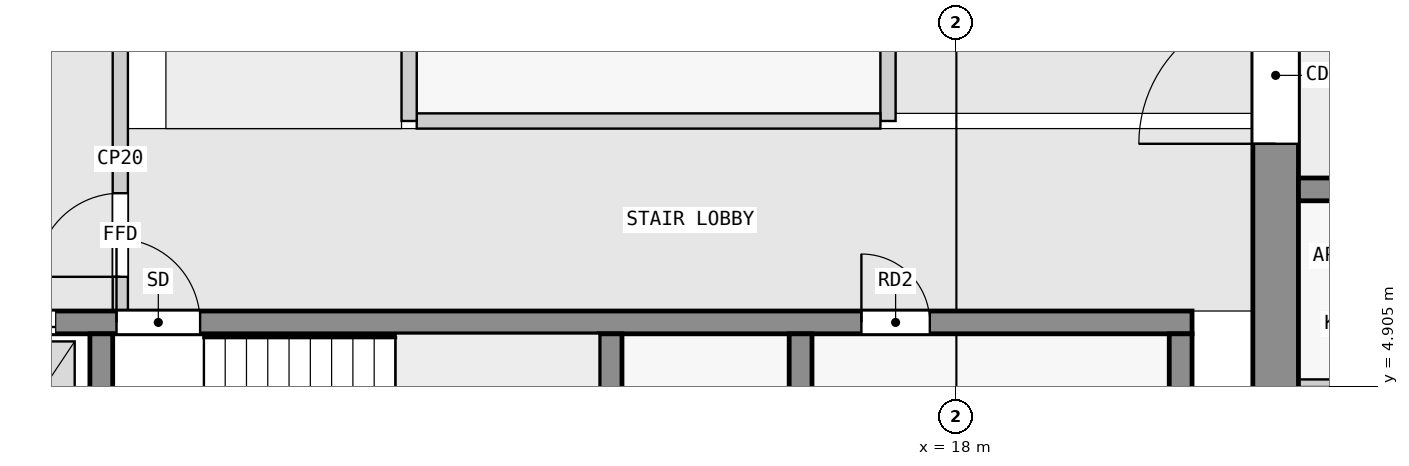
"""IFC4 building model, lengths in metres.
Left out: names, types, materials, properties, quantities, classifications, styles, units other than length and angle.
Written with IfcOpenShell. Run it as: python <this file> out.ifc"""

import sys

from ifc_helpers import new_model, si_unit, direction, frame, frame_2d, origin, place, context, subcontext, project, spatial, rectangle, extrude, element, fill, save


model = new_model("IFC4")
c1 = context("Model", 3, precision=1e-05, world=origin(), true_north=direction((0.0, 1.0)))
c2 = subcontext(c1, "Body", "Model", "MODEL_VIEW")
j1 = project(units=[si_unit("LENGTHUNIT", "METRE"), si_unit("PLANEANGLEUNIT", "RADIAN")], contexts=[c1])
p1 = place(None, origin())
s1 = spatial("IfcSite", under=j1, at=p1, CompositionType="ELEMENT")
p2 = place(p1, origin())
s2 = spatial("IfcBuilding", under=s1, at=p2, CompositionType="ELEMENT")
p3 = place(p2, frame((0.0, 0.0, 156.9)))
s3 = spatial("IfcBuildingStorey", under=s2, at=p3, CompositionType="ELEMENT", Elevation=156.9)
p4 = place(p3, frame((22.2, 2.5, 0.0), z_axis=(0.0, 0.0, 1.0), x_axis=(0.0, 1.0, 0.0)))
e1 = element("IfcWall", 1, at=p4, inside=s3, PredefinedType="SHEAR", context=c2, shape_type="SweptSolid", body=[
    extrude(rectangle(XDim=14.9, YDim=0.6, at=frame_2d((7.45, 0.0))), origin(), (0.0, 0.0, 1.0), 3.25),
])
p5 = place(p4, frame((5.6, 0.0, 0.0)))
e2 = element("IfcOpeningElement", 2, at=p5, cuts=e1, PredefinedType="OPENING", context=c2, shape_type="SweptSolid", body=[
    extrude(rectangle(XDim=1.8, YDim=2.1, at=frame_2d((0.9, 1.05))), frame((0.0, 0.31, 0.0), z_axis=(0.0, -1.0, 0.0), x_axis=(1.0, 0.0, 0.0)), (0.0, 0.0, 1.0), 0.62),
])
for number, where, z_axis, x_axis in (
    (3, (6.75, 2.8, 0.0), (0.0, 0.0, 1.0), (0.0, 1.0, 0.0)),
    (4, (13.45, 2.8, 0.0), (0.0, 0.0, 1.0), (0.0, 1.0, 0.0)),
    (5, (20.95, 2.8, 0.0), (0.0, 0.0, 1.0), (0.0, 1.0, 0.0)),
):
    element("IfcWall", number, at=place(p3, frame(where, z_axis=z_axis, x_axis=x_axis)), inside=s3, PredefinedType="SHEAR", context=c2, shape_type="SweptSolid", body=[
        extrude(rectangle(XDim=2.8, YDim=0.3, at=frame_2d((1.4, 0.0))), origin(), (0.0, 0.0, 1.0), 3.25),
    ])
p6 = place(p3, frame((2.3, 5.75, 0.0), z_axis=(0.0, 0.0, 1.0), x_axis=(1.0, 0.0, 0.0)))
e6 = element("IfcWall", 6, at=p6, inside=s3, PredefinedType="SHEAR", context=c2, shape_type="SweptSolid", body=[
    extrude(rectangle(XDim=18.8, YDim=0.3, at=frame_2d((9.4, 0.0))), origin(), (0.0, 0.0, 1.0), 3.25),
])
p7 = place(p6, frame((4.65, 0.0, 0.0)))
e7 = element("IfcOpeningElement", 7, at=p7, cuts=e6, PredefinedType="OPENING", context=c2, shape_type="SweptSolid", body=[
    extrude(rectangle(XDim=1.1, YDim=2.1, at=frame_2d((0.55, 1.05))), frame((0.0, 0.16, 0.0), z_axis=(0.0, -1.0, 0.0), x_axis=(1.0, 0.0, 0.0)), (0.0, 0.0, 1.0), 0.32),
])
p8 = place(p6, frame((0.45, 0.0, 0.0)))
e8 = element("IfcOpeningElement", 8, at=p8, cuts=e6, PredefinedType="OPENING", context=c2, shape_type="SweptSolid", body=[
    extrude(rectangle(XDim=1.1, YDim=2.1, at=frame_2d((0.55, 1.05))), frame((0.0, 0.16, 0.0), z_axis=(0.0, -1.0, 0.0), x_axis=(1.0, 0.0, 0.0)), (0.0, 0.0, 1.0), 0.32),
])
p9 = place(p6, frame((2.75, 0.0, 0.0)))
e9 = element("IfcOpeningElement", 9, at=p9, cuts=e6, PredefinedType="OPENING", context=c2, shape_type="SweptSolid", body=[
    extrude(rectangle(XDim=1.1, YDim=2.1, at=frame_2d((0.55, 1.05))), frame((0.0, 0.16, 0.0), z_axis=(0.0, -1.0, 0.0), x_axis=(1.0, 0.0, 0.0)), (0.0, 0.0, 1.0), 0.32),
])
p10 = place(p6, frame((14.45, 0.0, 0.0)))
e10 = element("IfcOpeningElement", 10, at=p10, cuts=e6, PredefinedType="OPENING", context=c2, shape_type="SweptSolid", body=[
    extrude(rectangle(XDim=0.9, YDim=2.1, at=frame_2d((0.45, 1.05))), frame((0.0, 0.16, 0.0), z_axis=(0.0, -1.0, 0.0), x_axis=(1.0, 0.0, 0.0)), (0.0, 0.0, 1.0), 0.32),
])
p11 = place(p3, frame((22.5, 7.5, 0.0), z_axis=(0.0, 0.0, 1.0), x_axis=(1.0, 0.0, 0.0)))
e11 = element("IfcWall", 11, at=p11, inside=s3, PredefinedType="SHEAR", context=c2, shape_type="SweptSolid", body=[
    extrude(rectangle(XDim=22.5, YDim=0.3, at=frame_2d((11.25, 0.0))), origin(), (0.0, 0.0, 1.0), 3.25),
])
p12 = place(p11, frame((4.05, 0.0, 0.0)))
e12 = element("IfcOpeningElement", 12, at=p12, cuts=e11, PredefinedType="OPENING", context=c2, shape_type="SweptSolid", body=[
    extrude(rectangle(XDim=1.0, YDim=2.1, at=frame_2d((0.5, 1.05))), frame((0.0, 0.16, 0.0), z_axis=(0.0, -1.0, 0.0), x_axis=(1.0, 0.0, 0.0)), (0.0, 0.0, 1.0), 0.32),
])
p13 = place(p11, frame((10.35, 0.0, 0.0)))
e13 = element("IfcOpeningElement", 13, at=p13, cuts=e11, PredefinedType="OPENING", context=c2, shape_type="SweptSolid", body=[
    extrude(rectangle(XDim=1.8, YDim=2.1, at=frame_2d((0.9, 1.05))), frame((0.0, 0.16, 0.0), z_axis=(0.0, -1.0, 0.0), x_axis=(1.0, 0.0, 0.0)), (0.0, 0.0, 1.0), 0.32),
])
p14 = place(p11, frame((16.85, 0.0, 0.0)))
e14 = element("IfcOpeningElement", 14, at=p14, cuts=e11, PredefinedType="OPENING", context=c2, shape_type="SweptSolid", body=[
    extrude(rectangle(XDim=1.0, YDim=2.1, at=frame_2d((0.5, 1.05))), frame((0.0, 0.16, 0.0), z_axis=(0.0, -1.0, 0.0), x_axis=(1.0, 0.0, 0.0)), (0.0, 0.0, 1.0), 0.32),
])
p15 = place(p3, frame((7.0, 5.9, 0.0), z_axis=(0.0, 0.0, 1.0), x_axis=(0.0, 1.0, 0.0)))
e15 = element("IfcWall", 15, at=p15, inside=s3, PredefinedType="PARTITIONING", context=c2, shape_type="SweptSolid", body=[
    extrude(rectangle(XDim=4.0, YDim=0.2, at=frame_2d((2.0, 0.0))), origin(), (0.0, 0.0, 1.0), 3.25),
])
p16 = place(p15, frame((0.45, 0.0, 0.0)))
e16 = element("IfcOpeningElement", 16, at=p16, cuts=e15, PredefinedType="OPENING", context=c2, shape_type="SweptSolid", body=[
    extrude(rectangle(XDim=1.1, YDim=2.1, at=frame_2d((0.55, 1.05))), frame((0.0, 0.11, 0.0), z_axis=(0.0, -1.0, 0.0), x_axis=(1.0, 0.0, 0.0)), (0.0, 0.0, 1.0), 0.22),
])
p17 = place(p3, frame((10.8, 8.4, 0.0), z_axis=(0.0, 0.0, 1.0), x_axis=(0.0, 1.0, 0.0)))
e17 = element("IfcWall", 17, at=p17, inside=s3, PredefinedType="PARTITIONING", context=c2, shape_type="SweptSolid", body=[
    extrude(rectangle(XDim=3.8, YDim=0.2, at=frame_2d((1.9, 0.0))), origin(), (0.0, 0.0, 1.0), 3.25),
])
p18 = place(p3, frame((10.9, 8.4, 0.0), z_axis=(0.0, 0.0, 1.0), x_axis=(1.0, 0.0, 0.0)))
e18 = element("IfcWall", 18, at=p18, inside=s3, PredefinedType="PARTITIONING", context=c2, shape_type="SweptSolid", body=[
    extrude(rectangle(XDim=6.1, YDim=0.2, at=frame_2d((3.05, 0.0))), origin(), (0.0, 0.0, 1.0), 3.25),
])
p19 = place(p3, frame((17.1, 8.4, 0.0), z_axis=(0.0, 0.0, 1.0), x_axis=(0.0, 1.0, 0.0)))
e19 = element("IfcWall", 19, at=p19, inside=s3, PredefinedType="PARTITIONING", context=c2, shape_type="SweptSolid", body=[
    extrude(rectangle(XDim=3.8, YDim=0.2, at=frame_2d((1.9, 0.0))), origin(), (0.0, 0.0, 1.0), 3.25),
])
p20 = place(p3, frame((22.5, 4.95, 0.0), z_axis=(0.0, 0.0, 1.0), x_axis=(1.0, 0.0, 0.0)))
e20 = element("IfcWall", 20, at=p20, inside=s3, PredefinedType="PARTITIONING", context=c2, shape_type="SweptSolid", body=[
    extrude(rectangle(XDim=1.75, YDim=0.1, at=frame_2d((0.875, 0.0))), origin(), (0.0, 0.0, 1.0), 3.25),
])
p21 = place(p3, frame((15.95, 2.8, 0.0), z_axis=(0.0, 0.0, 1.0), x_axis=(0.0, 1.0, 0.0)))
e21 = element("IfcWall", 21, at=p21, inside=s3, PredefinedType="SHEAR", context=c2, shape_type="SweptSolid", body=[
    extrude(rectangle(XDim=2.8, YDim=0.3, at=frame_2d((1.4, 0.0))), origin(), (0.0, 0.0, 1.0), 3.25),
])
p22 = place(p16, origin())
e22 = element("IfcDoor", 22, at=p22, inside=s3, OperationType="SINGLE_SWING_LEFT", PredefinedType="DOOR", context=c2, shape_type="SweptSolid", body=[
    extrude(rectangle(XDim=1.1, YDim=2.1, at=frame_2d((0.55, 1.05))), frame((0.0, 0.025, 0.0), z_axis=(0.0, -1.0, 0.0), x_axis=(1.0, 0.0, 0.0)), (0.0, 0.0, 1.0), 0.05),
])
fill(e16, e22)
p23 = place(p7, origin())
e23 = element("IfcDoor", 23, at=p23, inside=s3, OperationType="SINGLE_SWING_LEFT", PredefinedType="DOOR", context=c2, shape_type="SweptSolid", body=[
    extrude(rectangle(XDim=1.1, YDim=2.1, at=frame_2d((0.55, 1.05))), frame((0.0, 0.025, 0.0), z_axis=(0.0, -1.0, 0.0), x_axis=(1.0, 0.0, 0.0)), (0.0, 0.0, 1.0), 0.05),
])
fill(e7, e23)
p24 = place(p9, origin())
e24 = element("IfcDoor", 24, at=p24, inside=s3, OperationType="DOUBLE_DOOR_SLIDING", PredefinedType="DOOR", context=c2, shape_type="SweptSolid", body=[
    extrude(rectangle(XDim=1.1, YDim=2.1, at=frame_2d((0.55, 1.05))), frame((0.0, 0.025, 0.0), z_axis=(0.0, -1.0, 0.0), x_axis=(1.0, 0.0, 0.0)), (0.0, 0.0, 1.0), 0.05),
])
fill(e9, e24)
p25 = place(p5, origin())
e25 = element("IfcDoor", 25, at=p25, inside=s3, OperationType="DOUBLE_DOOR_SINGLE_SWING", PredefinedType="DOOR", context=c2, shape_type="SweptSolid", body=[
    extrude(rectangle(XDim=1.8, YDim=2.1, at=frame_2d((0.9, 1.05))), frame((0.0, 0.025, 0.0), z_axis=(0.0, -1.0, 0.0), x_axis=(1.0, 0.0, 0.0)), (0.0, 0.0, 1.0), 0.05),
])
fill(e2, e25)
p26 = place(p10, origin())
e26 = element("IfcDoor", 26, at=p26, inside=s3, OperationType="SINGLE_SWING_LEFT", PredefinedType="DOOR", context=c2, shape_type="SweptSolid", body=[
    extrude(rectangle(XDim=0.9, YDim=2.1, at=frame_2d((0.45, 1.05))), frame((0.0, 0.025, 0.0), z_axis=(0.0, -1.0, 0.0), x_axis=(1.0, 0.0, 0.0)), (0.0, 0.0, 1.0), 0.05),
])
fill(e10, e26)
save(model, sys.argv[1])
